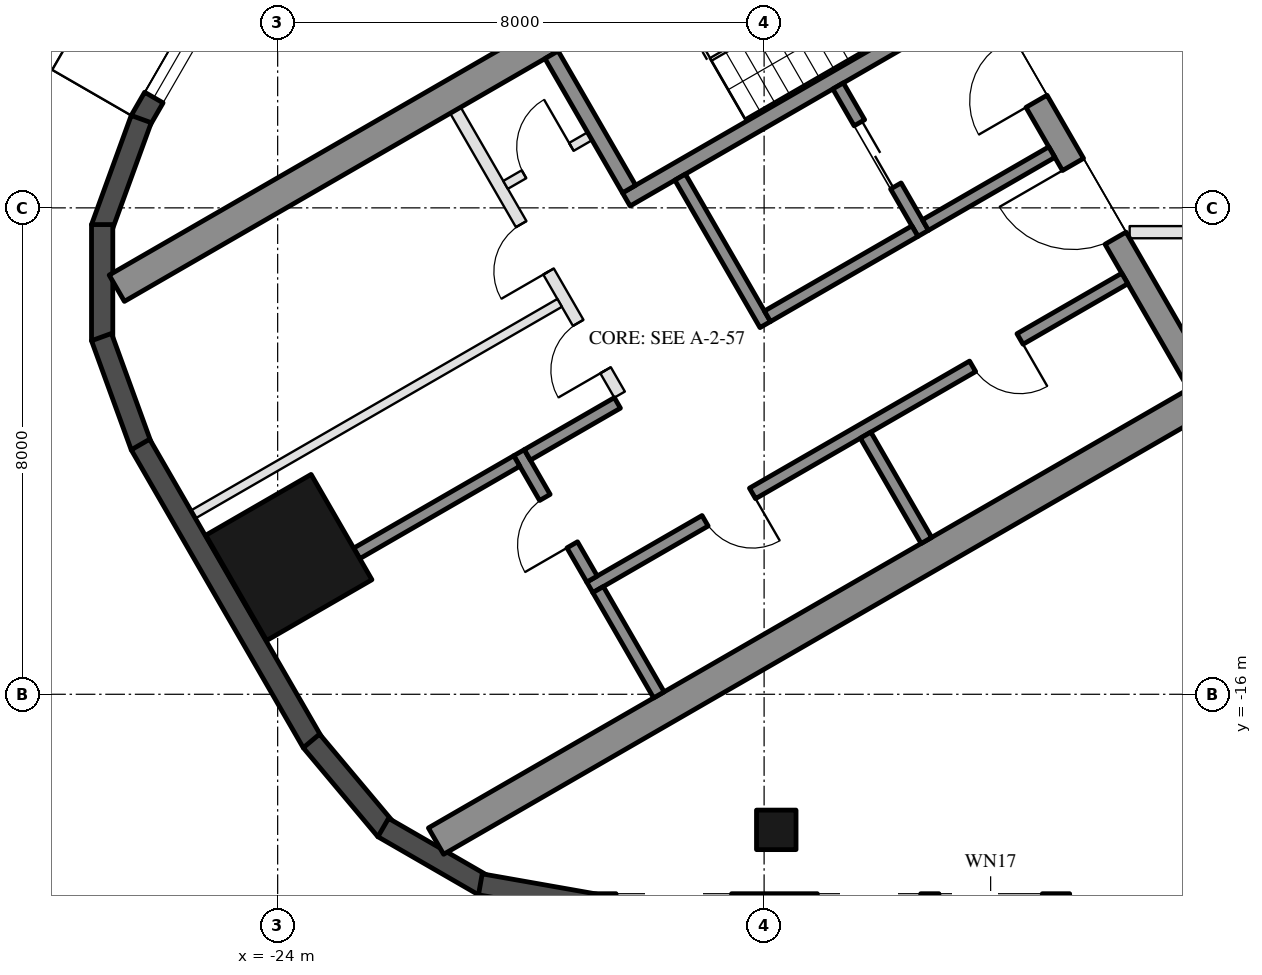
"""IFC4 building model, lengths in metres.
Left out: names, types, materials, properties, quantities, classifications, styles, units other than length and angle.
Written with IfcOpenShell. Run it as: python <this file> out.ifc"""

import sys

from ifc_helpers import new_model, si_unit, direction, frame, frame_2d, origin, origin_2d, place, context, subcontext, project, spatial, rectangle, hollow_rectangle, extrude, element, fill, save


model = new_model("IFC4")
c1 = context("Model", 3, precision=1e-05, world=origin(), true_north=direction((0.0, 1.0)))
c2 = subcontext(c1, "Body", "Model", "MODEL_VIEW")
j1 = project(units=[si_unit("LENGTHUNIT", "METRE"), si_unit("PLANEANGLEUNIT", "RADIAN")], contexts=[c1])
p1 = place(None, origin())
s1 = spatial("IfcSite", under=j1, at=p1, CompositionType="ELEMENT")
p2 = place(p1, origin())
s2 = spatial("IfcBuilding", under=s1, at=p2, CompositionType="ELEMENT")
p3 = place(p2, frame((0.0, 0.0, 246.7)))
s3 = spatial("IfcBuildingStorey", under=s2, at=p3, CompositionType="ELEMENT", Elevation=246.7)
p4 = place(p3, frame((-15.8, -18.23, 0.0), z_axis=(0.0, 0.0, 1.0), x_axis=(-1.0, 0.0, 0.0)))
e1 = element("IfcColumn", 1, at=p4, inside=s3, PredefinedType="COLUMN", context=c2, shape_type="SweptSolid", body=[
    extrude(hollow_rectangle(XDim=0.65, YDim=0.65, WallThickness=0.03, at=origin_2d()), origin(), (0.0, 0.0, 1.0), 3.7),
])
p5 = place(p3, frame((-23.816, -13.75, 0.0), z_axis=(0.0, 0.0, 1.0), x_axis=(-0.5, 0.866025403784, 0.0)))
e2 = element("IfcColumn", 2, at=p5, inside=s3, PredefinedType="COLUMN", context=c2, shape_type="SweptSolid", body=[
    extrude(hollow_rectangle(XDim=2.0, YDim=2.0, WallThickness=0.05, at=origin_2d()), origin(), (0.0, 0.0, 1.0), 3.7),
])
p6 = place(p3, frame((-24.299, -3.176, 0.0), z_axis=(0.0, 0.0, 1.0), x_axis=(-0.500028278809, -0.866009076391, 0.0)))
e3 = element("IfcWall", 3, at=p6, inside=s3, PredefinedType="SOLIDWALL", context=c2, shape_type="SweptSolid", body=[
    extrude(rectangle(XDim=3.916, YDim=0.35, at=frame_2d((1.958, 0.0))), origin(), (0.0, 0.0, 1.0), 3.55),
])
p7 = place(p6, frame((1.575, 0.0, 0.3)))
e4 = element("IfcOpeningElement", 4, at=p7, cuts=e3, PredefinedType="OPENING", context=c2, shape_type="SweptSolid", body=[
    extrude(rectangle(XDim=1.9, YDim=2.65, at=frame_2d((0.95, 1.325))), frame((0.0, 0.185, 0.0), z_axis=(0.0, -1.0, 0.0), x_axis=(1.0, 0.0, 0.0)), (0.0, 0.0, 1.0), 0.37),
])
for number, where, z_axis, x_axis in (
    (5, (-26.244, -6.54, 0.0), (0.0, 0.0, 1.0), (-0.342, -0.94, 0.0)),
    (6, (-26.886, -8.275, 0.0), (0.0, 0.0, 1.0), (0.0, -1.0, 0.0)),
    (7, (-26.897, -10.125, 0.0), (0.0, 0.0, 1.0), (0.342, -0.94, 0.0)),
):
    element("IfcWall", number, at=place(p3, frame(where, z_axis=z_axis, x_axis=x_axis)), inside=s3, PredefinedType="SOLIDWALL", context=c2, shape_type="SweptSolid", body=[
        extrude(rectangle(XDim=1.91, YDim=0.35, at=frame_2d((0.955, 0.0))), origin(), (0.0, 0.0, 1.0), 3.55),
    ])
p8 = place(p3, frame((-26.257, -11.893, 0.0), z_axis=(0.0, 0.0, 1.0), x_axis=(0.500018773155, -0.866014564827, 0.0)))
e8 = element("IfcWall", 8, at=p8, inside=s3, PredefinedType="SOLIDWALL", context=c2, shape_type="SweptSolid", body=[
    extrude(rectangle(XDim=5.658, YDim=0.35, at=frame_2d((2.829, 0.0))), origin(), (0.0, 0.0, 1.0), 3.55),
])
for number, where, z_axis, x_axis in (
    (9, (-23.445, -16.768, 0.0), (0.0, 0.0, 1.0), (0.643, -0.766, 0.0)),
    (10, (-22.264, -18.192, 0.0), (0.0, 0.0, 1.0), (0.866, -0.5, 0.0)),
):
    element("IfcWall", number, at=place(p3, frame(where, z_axis=z_axis, x_axis=x_axis)), inside=s3, PredefinedType="SOLIDWALL", context=c2, shape_type="SweptSolid", body=[
        extrude(rectangle(XDim=1.91, YDim=0.35, at=frame_2d((0.955, 0.0))), origin(), (0.0, 0.0, 1.0), 3.55),
    ])
p9 = place(p3, frame((-20.667, -19.126, 0.0), z_axis=(0.0, 0.0, 1.0), x_axis=(0.984798995425, -0.173697837091, 0.0)))
e11 = element("IfcWall", 11, at=p9, inside=s3, PredefinedType="SOLIDWALL", context=c2, shape_type="SweptSolid", body=[
    extrude(rectangle(XDim=1.91, YDim=0.35, at=frame_2d((0.955, 0.0))), origin(), (0.0, 0.0, 1.0), 3.55),
])
p10 = place(p3, frame((-18.816, -19.455, 0.0), z_axis=(0.0, 0.0, 1.0), x_axis=(1.0, 0.0, 0.0)))
e12 = element("IfcWall", 12, at=p10, inside=s3, PredefinedType="SOLIDWALL", context=c2, shape_type="SweptSolid", body=[
    extrude(rectangle(XDim=11.816, YDim=0.35, at=frame_2d((5.908, 0.0))), origin(), (0.0, 0.0, 1.0), 3.55),
])
p11 = place(p10, frame((0.381, 0.0, 0.3)))
e13 = element("IfcOpeningElement", 13, at=p11, cuts=e12, PredefinedType="OPENING", context=c2, shape_type="SweptSolid", body=[
    extrude(rectangle(XDim=1.9, YDim=2.65, at=frame_2d((0.95, 1.325))), frame((0.0, 0.185, 0.0), z_axis=(0.0, -1.0, 0.0), x_axis=(1.0, 0.0, 0.0)), (0.0, 0.0, 1.0), 0.37),
])
p12 = place(p10, frame((7.841, 0.0, 0.0)))
e14 = element("IfcOpeningElement", 14, at=p12, cuts=e12, PredefinedType="OPENING", context=c2, shape_type="SweptSolid", body=[
    extrude(rectangle(XDim=2.4, YDim=2.4, at=frame_2d((1.2, 1.2))), frame((0.0, 0.185, 0.0), z_axis=(0.0, -1.0, 0.0), x_axis=(1.0, 0.0, 0.0)), (0.0, 0.0, 1.0), 0.37),
])
p13 = place(p10, frame((3.691, 0.0, 0.3)))
e15 = element("IfcOpeningElement", 15, at=p13, cuts=e12, PredefinedType="OPENING", context=c2, shape_type="SweptSolid", body=[
    extrude(rectangle(XDim=1.7, YDim=2.65, at=frame_2d((0.85, 1.325))), frame((0.0, 0.185, 0.0), z_axis=(0.0, -1.0, 0.0), x_axis=(1.0, 0.0, 0.0)), (0.0, 0.0, 1.0), 0.37),
])
p14 = place(p10, frame((5.691, 0.0, 0.3)))
e16 = element("IfcOpeningElement", 16, at=p14, cuts=e12, PredefinedType="OPENING", context=c2, shape_type="SweptSolid", body=[
    extrude(rectangle(XDim=1.7, YDim=2.65, at=frame_2d((0.85, 1.325))), frame((0.0, 0.185, 0.0), z_axis=(0.0, -1.0, 0.0), x_axis=(1.0, 0.0, 0.0)), (0.0, 0.0, 1.0), 0.37),
])
for number, where, z_axis, x_axis in (
    (17, (-13.797, -1.903, 0.0), (0.0, 0.0, 1.0), (-0.866, -0.5, 0.0)),
    (18, (-8.547, -10.997, 0.0), (0.0, 0.0, 1.0), (-0.866, -0.5, 0.0)),
):
    element("IfcWall", number, at=place(p3, frame(where, z_axis=z_axis, x_axis=x_axis)), inside=s3, PredefinedType="SHEAR", context=c2, shape_type="SweptSolid", body=[
        extrude(rectangle(XDim=14.837, YDim=0.5, at=frame_2d((7.418, 0.0))), origin(), (0.0, 0.0, 1.0), 3.5),
    ])
p15 = place(p3, frame((-13.845, -2.22, 0.0), z_axis=(0.0, 0.0, 1.0), x_axis=(0.500004234368, -0.866022959057, 0.0)))
e19 = element("IfcWall", 19, at=p15, inside=s3, PredefinedType="SHEAR", context=c2, shape_type="SweptSolid", body=[
    extrude(rectangle(XDim=10.0, YDim=0.4, at=frame_2d((5.0, 0.0))), origin(), (0.0, 0.0, 1.0), 3.5),
])
p16 = place(p15, frame((3.55, 0.0, 0.0)))
e20 = element("IfcOpeningElement", 20, at=p16, cuts=e19, PredefinedType="OPENING", context=c2, shape_type="SweptSolid", body=[
    extrude(rectangle(XDim=1.1, YDim=2.1, at=frame_2d((0.55, 1.05))), frame((0.0, 0.21, 0.0), z_axis=(0.0, -1.0, 0.0), x_axis=(1.0, 0.0, 0.0)), (0.0, 0.0, 1.0), 0.42),
])
p17 = place(p15, frame((5.85, 0.0, 0.0)))
e21 = element("IfcOpeningElement", 21, at=p17, cuts=e19, PredefinedType="OPENING", context=c2, shape_type="SweptSolid", body=[
    extrude(rectangle(XDim=1.4, YDim=2.1, at=frame_2d((0.7, 1.05))), frame((0.0, 0.21, 0.0), z_axis=(0.0, -1.0, 0.0), x_axis=(1.0, 0.0, 0.0)), (0.0, 0.0, 1.0), 0.42),
])
p18 = place(p3, frame((-12.681, -4.636, 0.0), z_axis=(0.0, 0.0, 1.0), x_axis=(-0.866021702275, -0.500006411147, 0.0)))
e22 = element("IfcWall", 22, at=p18, inside=s3, PredefinedType="SHEAR", context=c2, shape_type="SweptSolid", body=[
    extrude(rectangle(XDim=6.45, YDim=0.25, at=frame_2d((3.225, 0.0))), origin(), (0.0, 0.0, 1.0), 3.5),
])
p19 = place(p18, frame((0.3, 0.0, 0.0)))
e23 = element("IfcOpeningElement", 23, at=p19, cuts=e22, PredefinedType="OPENING", context=c2, shape_type="SweptSolid", body=[
    extrude(rectangle(XDim=1.0, YDim=2.1, at=frame_2d((0.5, 1.05))), frame((0.0, 0.135, 0.0), z_axis=(0.0, -1.0, 0.0), x_axis=(1.0, 0.0, 0.0)), (0.0, 0.0, 1.0), 0.27),
])
p20 = place(p3, frame((-19.496, -5.482, 0.0), z_axis=(0.0, 0.0, 1.0), x_axis=(0.499990435942, -0.866030925526, 0.0)))
e24 = element("IfcWall", 24, at=p20, inside=s3, PredefinedType="SHEAR", context=c2, shape_type="SweptSolid", body=[
    extrude(rectangle(XDim=2.55, YDim=0.25, at=frame_2d((1.275, 0.0))), origin(), (0.0, 0.0, 1.0), 3.5),
])
p21 = place(p3, frame((-17.381, -7.495, 0.0), z_axis=(0.0, 0.0, 1.0), x_axis=(0.500011755427, -0.866018616679, 0.0)))
e25 = element("IfcWall", 25, at=p21, inside=s3, PredefinedType="SHEAR", context=c2, shape_type="SweptSolid", body=[
    extrude(rectangle(XDim=2.8, YDim=0.2, at=frame_2d((1.4, 0.0))), origin(), (0.0, 0.0, 1.0), 3.5),
])
p22 = place(p3, frame((-14.783, -5.995, 0.0), z_axis=(0.0, 0.0, 1.0), x_axis=(0.49994636267, -0.866056369097, 0.0)))
e26 = element("IfcWall", 26, at=p22, inside=s3, PredefinedType="SHEAR", context=c2, shape_type="SweptSolid", body=[
    extrude(rectangle(XDim=2.8, YDim=0.2, at=frame_2d((1.4, 0.0))), origin(), (0.0, 0.0, 1.0), 3.5),
])
p23 = place(p22, frame((0.7, 0.0, 0.0)))
e27 = element("IfcOpeningElement", 27, at=p23, cuts=e26, PredefinedType="OPENING", context=c2, shape_type="SweptSolid", body=[
    extrude(rectangle(XDim=1.2, YDim=2.1, at=frame_2d((0.6, 1.05))), frame((0.0, 0.11, 0.0), z_axis=(0.0, -1.0, 0.0), x_axis=(1.0, 0.0, 0.0)), (0.0, 0.0, 1.0), 0.22),
])
p24 = place(p3, frame((-13.52, -8.383, 0.0), z_axis=(0.0, 0.0, 1.0), x_axis=(-0.866034573852, -0.49998411664, 0.0)))
e28 = element("IfcWall", 28, at=p24, inside=s3, PredefinedType="SHEAR", context=c2, shape_type="SweptSolid", body=[
    extrude(rectangle(XDim=2.8, YDim=0.2, at=frame_2d((1.4, 0.0))), origin(), (0.0, 0.0, 1.0), 3.5),
])
p25 = place(p3, frame((-11.268, -7.083, 0.0), z_axis=(0.0, 0.0, 1.0), x_axis=(-0.866050077142, -0.499957262057, 0.0)))
e29 = element("IfcWall", 29, at=p25, inside=s3, PredefinedType="SHEAR", context=c2, shape_type="SweptSolid", body=[
    extrude(rectangle(XDim=2.4, YDim=0.2, at=frame_2d((1.2, 0.0))), origin(), (0.0, 0.0, 1.0), 3.5),
])
p26 = place(p3, frame((-10.068, -9.162, 0.0), z_axis=(0.0, 0.0, 1.0), x_axis=(-0.866032725843, -0.499987317609, 0.0)))
e30 = element("IfcWall", 30, at=p26, inside=s3, PredefinedType="SHEAR", context=c2, shape_type="SweptSolid", body=[
    extrude(rectangle(XDim=10.16, YDim=0.2, at=frame_2d((5.08, 0.0))), origin(), (0.0, 0.0, 1.0), 3.5),
])
p27 = place(p26, frame((1.99, 0.0, 0.0)))
e31 = element("IfcOpeningElement", 31, at=p27, cuts=e30, PredefinedType="OPENING", context=c2, shape_type="SweptSolid", body=[
    extrude(rectangle(XDim=0.9, YDim=2.1, at=frame_2d((0.45, 1.05))), frame((0.0, 0.11, 0.0), z_axis=(0.0, -1.0, 0.0), x_axis=(1.0, 0.0, 0.0)), (0.0, 0.0, 1.0), 0.22),
])
p28 = place(p26, frame((7.07, 0.0, 0.0)))
e32 = element("IfcOpeningElement", 32, at=p28, cuts=e30, PredefinedType="OPENING", context=c2, shape_type="SweptSolid", body=[
    extrude(rectangle(XDim=0.9, YDim=2.1, at=frame_2d((0.45, 1.05))), frame((0.0, 0.11, 0.0), z_axis=(0.0, -1.0, 0.0), x_axis=(1.0, 0.0, 0.0)), (0.0, 0.0, 1.0), 0.22),
])
p29 = place(p3, frame((-20.031, -12.026, 0.0), z_axis=(0.0, 0.0, 1.0), x_axis=(0.500033551112, -0.866006032174, 0.0)))
e33 = element("IfcWall", 33, at=p29, inside=s3, PredefinedType="SHEAR", context=c2, shape_type="SweptSolid", body=[
    extrude(rectangle(XDim=2.4, YDim=0.2, at=frame_2d((1.2, 0.0))), origin(), (0.0, 0.0, 1.0), 3.5),
])
p30 = place(p29, frame((0.85, 0.0, 0.0)))
e34 = element("IfcOpeningElement", 34, at=p30, cuts=e33, PredefinedType="OPENING", context=c2, shape_type="SweptSolid", body=[
    extrude(rectangle(XDim=0.9, YDim=2.1, at=frame_2d((0.45, 1.05))), frame((0.0, 0.11, 0.0), z_axis=(0.0, -1.0, 0.0), x_axis=(1.0, 0.0, 0.0)), (0.0, 0.0, 1.0), 0.22),
])
p31 = place(p3, frame((-18.413, -11.208, 0.0), z_axis=(0.0, 0.0, 1.0), x_axis=(-0.866038183914, -0.499977863513, 0.0)))
e35 = element("IfcWall", 35, at=p31, inside=s3, PredefinedType="SHEAR", context=c2, shape_type="SweptSolid", body=[
    extrude(rectangle(XDim=1.71, YDim=0.2, at=frame_2d((0.855, 0.0))), origin(), (0.0, 0.0, 1.0), 3.5),
])
for number, where, z_axis, x_axis in (
    (36, (-14.331, -11.738, 0.0), (0.0, 0.0, 1.0), (0.5, -0.866, 0.0)),
    (37, (-18.73, -14.278, 0.0), (0.0, 0.0, 1.0), (0.5, -0.866, 0.0)),
):
    element("IfcWall", number, at=place(p3, frame(where, z_axis=z_axis, x_axis=x_axis)), inside=s3, PredefinedType="SHEAR", context=c2, shape_type="SweptSolid", body=[
        extrude(rectangle(XDim=2.0, YDim=0.2, at=frame_2d((1.0, 0.0))), origin(), (0.0, 0.0, 1.0), 3.5),
    ])
p32 = place(p3, frame((-20.067, -12.163, 0.0), z_axis=(0.0, 0.0, 1.0), x_axis=(-0.866030456496, -0.499991248344, 0.0)))
e38 = element("IfcWall", 38, at=p32, inside=s3, PredefinedType="SHEAR", context=c2, shape_type="SweptSolid", body=[
    extrude(rectangle(XDim=3.04, YDim=0.2, at=frame_2d((1.52, 0.0))), origin(), (0.0, 0.0, 1.0), 3.5),
])
p33 = place(p3, frame((-21.076, -6.395, 0.0), z_axis=(0.0, 0.0, 1.0), x_axis=(0.50001468107, -0.866016927499, 0.0)))
e39 = element("IfcWall", 39, at=p33, inside=s3, PredefinedType="PARTITIONING", context=c2, shape_type="SweptSolid", body=[
    extrude(rectangle(XDim=5.4, YDim=0.2, at=frame_2d((2.7, 0.0))), origin(), (0.0, 0.0, 1.0), 3.5),
])
p34 = place(p33, frame((2.163, 0.0, 0.0)))
e40 = element("IfcOpeningElement", 40, at=p34, cuts=e39, PredefinedType="OPENING", context=c2, shape_type="SweptSolid", body=[
    extrude(rectangle(XDim=0.9, YDim=2.1, at=frame_2d((0.45, 1.05))), frame((0.0, 0.11, 0.0), z_axis=(0.0, -1.0, 0.0), x_axis=(1.0, 0.0, 0.0)), (0.0, 0.0, 1.0), 0.22),
])
p35 = place(p33, frame((4.038, 0.0, 0.0)))
e41 = element("IfcOpeningElement", 41, at=p35, cuts=e39, PredefinedType="OPENING", context=c2, shape_type="SweptSolid", body=[
    extrude(rectangle(XDim=0.9, YDim=2.1, at=frame_2d((0.45, 1.05))), frame((0.0, 0.11, 0.0), z_axis=(0.0, -1.0, 0.0), x_axis=(1.0, 0.0, 0.0)), (0.0, 0.0, 1.0), 0.22),
])
p36 = place(p3, frame((-18.866, -6.822, 0.0), z_axis=(0.0, 0.0, 1.0), x_axis=(-0.866028054938, -0.499995408039, 0.0)))
e42 = element("IfcWall", 42, at=p36, inside=s3, PredefinedType="PARTITIONING", context=c2, shape_type="SweptSolid", body=[
    extrude(rectangle(XDim=1.6, YDim=0.15, at=frame_2d((0.8, 0.0))), origin(), (0.0, 0.0, 1.0), 3.5),
])
p37 = place(p36, frame((0.35, 0.0, 0.0)))
e43 = element("IfcOpeningElement", 43, at=p37, cuts=e42, PredefinedType="OPENING", context=c2, shape_type="SweptSolid", body=[
    extrude(rectangle(XDim=0.9, YDim=2.1, at=frame_2d((0.45, 1.05))), frame((0.0, 0.085, 0.0), z_axis=(0.0, -1.0, 0.0), x_axis=(1.0, 0.0, 0.0)), (0.0, 0.0, 1.0), 0.17),
])
p38 = place(p3, frame((-19.363, -9.562, 0.0), z_axis=(0.0, 0.0, 1.0), x_axis=(-0.866016523273, -0.500015381182, 0.0)))
e44 = element("IfcWall", 44, at=p38, inside=s3, PredefinedType="PARTITIONING", context=c2, shape_type="SweptSolid", body=[
    extrude(rectangle(XDim=6.95, YDim=0.15, at=frame_2d((3.475, 0.0))), origin(), (0.0, 0.0, 1.0), 3.5),
])
p39 = place(p3, frame((-4.807, -8.4, 0.0), z_axis=(0.0, 0.0, 1.0), x_axis=(-1.0, 0.0, 0.0)))
e45 = element("IfcWall", 45, at=p39, inside=s3, PredefinedType="PARTITIONING", context=c2, shape_type="SweptSolid", body=[
    extrude(rectangle(XDim=5.181, YDim=0.2, at=frame_2d((2.591, 0.0))), origin(), (0.0, 0.0, 1.0), 2.95),
])
p40 = place(p39, frame((2.091, 0.0, 0.0)))
e46 = element("IfcOpeningElement", 46, at=p40, cuts=e45, PredefinedType="OPENING", context=c2, shape_type="SweptSolid", body=[
    extrude(rectangle(XDim=1.0, YDim=2.1, at=frame_2d((0.5, 1.05))), frame((0.0, 0.11, 0.0), z_axis=(0.0, -1.0, 0.0), x_axis=(1.0, 0.0, 0.0)), (0.0, 0.0, 1.0), 0.22),
])
p41 = place(p7, origin())
e47 = element("IfcWindow", 47, at=p41, inside=s3, PartitioningType="SINGLE_PANEL", PredefinedType="WINDOW", context=c2, shape_type="SweptSolid", body=[
    extrude(rectangle(XDim=1.9, YDim=2.65, at=frame_2d((0.95, 1.325))), frame((0.0, 0.03, 0.0), z_axis=(0.0, -1.0, 0.0), x_axis=(1.0, 0.0, 0.0)), (0.0, 0.0, 1.0), 0.06),
])
fill(e4, e47)
p42 = place(p23, origin())
e48 = element("IfcDoor", 48, at=p42, inside=s3, OperationType="DOUBLE_DOOR_SLIDING", PredefinedType="DOOR", context=c2, shape_type="SweptSolid", body=[
    extrude(rectangle(XDim=1.2, YDim=2.1, at=frame_2d((0.6, 1.05))), frame((0.0, 0.025, 0.0), z_axis=(0.0, -1.0, 0.0), x_axis=(1.0, 0.0, 0.0)), (0.0, 0.0, 1.0), 0.05),
])
fill(e27, e48)
p43 = place(p37, frame((0.9, 0.0, 0.0), z_axis=(0.0, 0.0, 1.0), x_axis=(-1.0, 0.0, 0.0)))
e49 = element("IfcDoor", 49, at=p43, inside=s3, OperationType="SINGLE_SWING_RIGHT", PredefinedType="DOOR", context=c2, shape_type="SweptSolid", body=[
    extrude(rectangle(XDim=0.9, YDim=2.1, at=frame_2d((0.45, 1.05))), frame((0.0, 0.025, 0.0), z_axis=(0.0, -1.0, 0.0), x_axis=(1.0, 0.0, 0.0)), (0.0, 0.0, 1.0), 0.05),
])
fill(e43, e49)
p44 = place(p27, origin())
e50 = element("IfcDoor", 50, at=p44, inside=s3, OperationType="SINGLE_SWING_LEFT", PredefinedType="DOOR", context=c2, shape_type="SweptSolid", body=[
    extrude(rectangle(XDim=0.9, YDim=2.1, at=frame_2d((0.45, 1.05))), frame((0.0, 0.025, 0.0), z_axis=(0.0, -1.0, 0.0), x_axis=(1.0, 0.0, 0.0)), (0.0, 0.0, 1.0), 0.05),
])
fill(e31, e50)
p45 = place(p28, origin())
e51 = element("IfcDoor", 51, at=p45, inside=s3, OperationType="SINGLE_SWING_LEFT", PredefinedType="DOOR", context=c2, shape_type="SweptSolid", body=[
    extrude(rectangle(XDim=0.9, YDim=2.1, at=frame_2d((0.45, 1.05))), frame((0.0, 0.025, 0.0), z_axis=(0.0, -1.0, 0.0), x_axis=(1.0, 0.0, 0.0)), (0.0, 0.0, 1.0), 0.05),
])
fill(e32, e51)
p46 = place(p30, frame((0.9, 0.0, 0.0), z_axis=(0.0, 0.0, 1.0), x_axis=(-1.0, 0.0, 0.0)))
e52 = element("IfcDoor", 52, at=p46, inside=s3, OperationType="SINGLE_SWING_LEFT", PredefinedType="DOOR", context=c2, shape_type="SweptSolid", body=[
    extrude(rectangle(XDim=0.9, YDim=2.1, at=frame_2d((0.45, 1.05))), frame((0.0, 0.025, 0.0), z_axis=(0.0, -1.0, 0.0), x_axis=(1.0, 0.0, 0.0)), (0.0, 0.0, 1.0), 0.05),
])
fill(e34, e52)
p47 = place(p34, frame((0.9, 0.0, 0.0), z_axis=(0.0, 0.0, 1.0), x_axis=(-1.0, 0.0, 0.0)))
e53 = element("IfcDoor", 53, at=p47, inside=s3, OperationType="SINGLE_SWING_LEFT", PredefinedType="DOOR", context=c2, shape_type="SweptSolid", body=[
    extrude(rectangle(XDim=0.9, YDim=2.1, at=frame_2d((0.45, 1.05))), frame((0.0, 0.025, 0.0), z_axis=(0.0, -1.0, 0.0), x_axis=(1.0, 0.0, 0.0)), (0.0, 0.0, 1.0), 0.05),
])
fill(e40, e53)
p48 = place(p35, frame((0.9, 0.0, 0.0), z_axis=(0.0, 0.0, 1.0), x_axis=(-1.0, 0.0, 0.0)))
e54 = element("IfcDoor", 54, at=p48, inside=s3, OperationType="SINGLE_SWING_LEFT", PredefinedType="DOOR", context=c2, shape_type="SweptSolid", body=[
    extrude(rectangle(XDim=0.9, YDim=2.1, at=frame_2d((0.45, 1.05))), frame((0.0, 0.025, 0.0), z_axis=(0.0, -1.0, 0.0), x_axis=(1.0, 0.0, 0.0)), (0.0, 0.0, 1.0), 0.05),
])
fill(e41, e54)
p49 = place(p16, frame((1.1, 0.0, 0.0), z_axis=(0.0, 0.0, 1.0), x_axis=(-1.0, 0.0, 0.0)))
e55 = element("IfcDoor", 55, at=p49, inside=s3, OperationType="SINGLE_SWING_LEFT", PredefinedType="DOOR", context=c2, shape_type="SweptSolid", body=[
    extrude(rectangle(XDim=1.1, YDim=2.1, at=frame_2d((0.55, 1.05))), frame((0.0, 0.025, 0.0), z_axis=(0.0, -1.0, 0.0), x_axis=(1.0, 0.0, 0.0)), (0.0, 0.0, 1.0), 0.05),
])
fill(e20, e55)
p50 = place(p17, frame((1.4, 0.0, 0.0), z_axis=(0.0, 0.0, 1.0), x_axis=(-1.0, 0.0, 0.0)))
e56 = element("IfcDoor", 56, at=p50, inside=s3, OperationType="DOUBLE_DOOR_SINGLE_SWING", PredefinedType="DOOR", context=c2, shape_type="SweptSolid", body=[
    extrude(rectangle(XDim=1.4, YDim=2.1, at=frame_2d((0.7, 1.05))), frame((0.0, 0.025, 0.0), z_axis=(0.0, -1.0, 0.0), x_axis=(1.0, 0.0, 0.0)), (0.0, 0.0, 1.0), 0.05),
])
fill(e21, e56)
save(model, sys.argv[1])
